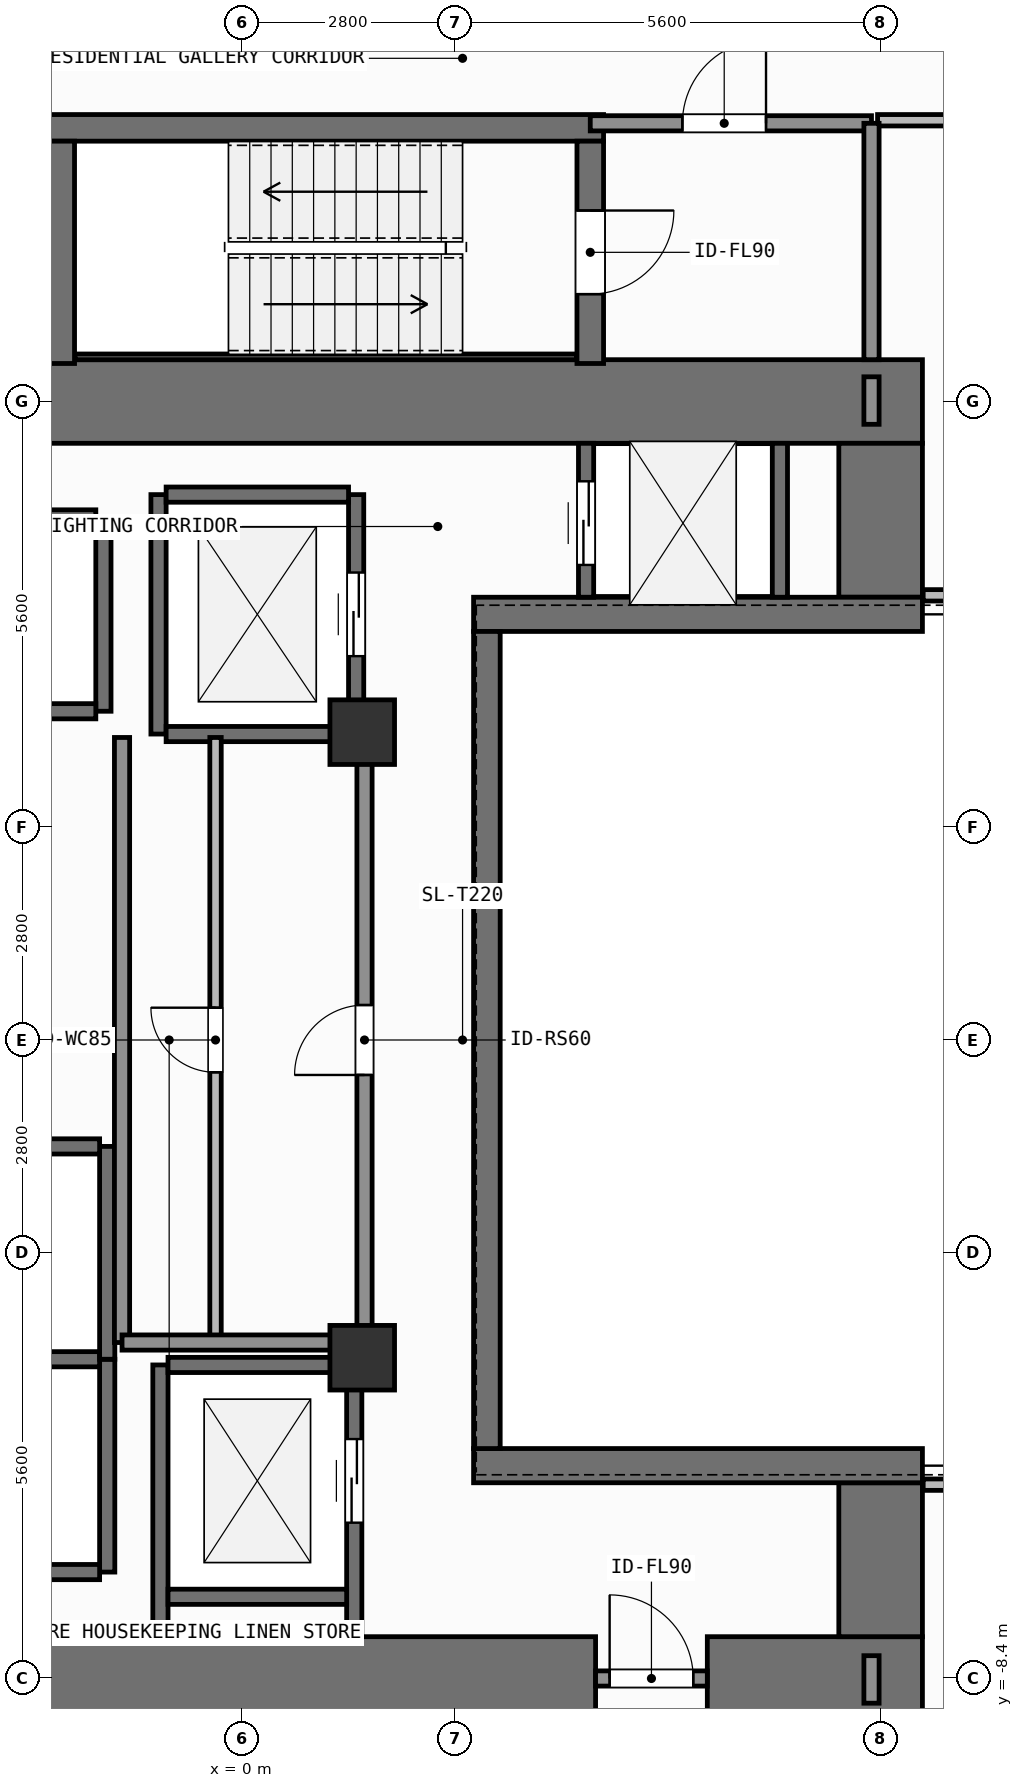
"""IFC4 building model, lengths in metres.
Left out: names, types, materials, properties, quantities, classifications, styles, units other than length and angle.
Written with IfcOpenShell. Run it as: python <this file> out.ifc"""

import sys

from ifc_helpers import new_model, si_unit, direction, frame, frame_2d, origin, origin_2d, place, context, subcontext, project, spatial, rectangle, extrude, element, fill, save


model = new_model("IFC4")
c1 = context("Model", 3, precision=1e-05, world=origin(), true_north=direction((0.0, 1.0)))
c2 = subcontext(c1, "Body", "Model", "MODEL_VIEW")
j1 = project(units=[si_unit("LENGTHUNIT", "METRE"), si_unit("PLANEANGLEUNIT", "RADIAN")], contexts=[c1])
p1 = place(None, origin())
s1 = spatial("IfcSite", under=j1, at=p1, CompositionType="ELEMENT")
p2 = place(p1, origin())
s2 = spatial("IfcBuilding", under=s1, at=p2, CompositionType="ELEMENT")
p3 = place(p2, frame((0.0, 0.0, 30.6)))
s3 = spatial("IfcBuildingStorey", under=s2, at=p3, CompositionType="ELEMENT", Elevation=30.6)
p4 = place(p3, frame((-2.62, -8.4, 0.0), z_axis=(0.0, 0.0, 1.0), x_axis=(1.0, 0.0, 0.0)))
e1 = element("IfcWall", 1, at=p4, inside=s3, PredefinedType="SHEAR", context=c2, shape_type="SweptSolid", body=[
    extrude(rectangle(XDim=7.27, YDim=1.1, at=frame_2d((3.635, 0.0))), origin(), (0.0, 0.0, 1.0), 3.9),
])
p5 = place(p3, frame((6.12, -8.4, 0.0), z_axis=(0.0, 0.0, 1.0), x_axis=(1.0, 0.0, 0.0)))
e2 = element("IfcWall", 2, at=p5, inside=s3, PredefinedType="SHEAR", context=c2, shape_type="SweptSolid", body=[
    extrude(rectangle(XDim=2.83, YDim=1.1, at=frame_2d((1.415, 0.0))), origin(), (0.0, 0.0, 1.0), 3.9),
])
p6 = place(p3, frame((-7.55, 8.4, 0.0), z_axis=(0.0, 0.0, 1.0), x_axis=(1.0, 0.0, 0.0)))
e3 = element("IfcWall", 3, at=p6, inside=s3, PredefinedType="SHEAR", context=c2, shape_type="SweptSolid", body=[
    extrude(rectangle(XDim=16.5, YDim=1.1, at=frame_2d((8.25, 0.0))), origin(), (0.0, 0.0, 1.0), 3.9),
])
for number, where, z_axis, x_axis in (
    (4, (8.4, -7.85, 0.0), (0.0, 0.0, 1.0), (0.0, 1.0, 0.0)),
    (5, (8.4, 5.825, 0.0), (0.0, 0.0, 1.0), (0.0, 1.0, 0.0)),
):
    element("IfcWall", number, at=place(p3, frame(where, z_axis=z_axis, x_axis=x_axis)), inside=s3, PredefinedType="SHEAR", context=c2, shape_type="SweptSolid", body=[
        extrude(rectangle(XDim=2.025, YDim=1.1, at=frame_2d((1.013, 0.0))), origin(), (0.0, 0.0, 1.0), 3.9),
    ])
for number, where, z_axis, x_axis in (
    (6, (3.045, -5.6, 0.0), (0.0, 0.0, 1.0), (1.0, 0.0, 0.0)),
    (7, (3.045, 5.6, 0.0), (0.0, 0.0, 1.0), (1.0, 0.0, 0.0)),
):
    element("IfcWall", number, at=place(p3, frame(where, z_axis=z_axis, x_axis=x_axis)), inside=s3, PredefinedType="SHEAR", context=c2, shape_type="SweptSolid", body=[
        extrude(rectangle(XDim=5.905, YDim=0.45, at=frame_2d((2.953, 0.0))), origin(), (0.0, 0.0, 1.0), 3.9),
    ])
p7 = place(p3, frame((3.22, -5.375, 0.0), z_axis=(0.0, 0.0, 1.0), x_axis=(0.0, 1.0, 0.0)))
e8 = element("IfcWall", 8, at=p7, inside=s3, PredefinedType="SHEAR", context=c2, shape_type="SweptSolid", body=[
    extrude(rectangle(XDim=10.75, YDim=0.35, at=frame_2d((5.375, 0.0))), origin(), (0.0, 0.0, 1.0), 3.9),
])
p8 = place(p3, frame((-2.555, 12.0, 0.0), z_axis=(0.0, 0.0, 1.0), x_axis=(1.0, 0.0, 0.0)))
e9 = element("IfcWall", 9, at=p8, inside=s3, PredefinedType="SHEAR", context=c2, shape_type="SweptSolid", body=[
    extrude(rectangle(XDim=7.31, YDim=0.35, at=frame_2d((3.655, 0.0))), origin(), (0.0, 0.0, 1.0), 3.9),
])
p9 = place(p3, frame((-2.2, 8.988, 0.0), z_axis=(0.0, 0.0, 1.0), x_axis=(1.0, 0.0, 0.0)))
e10 = element("IfcWall", 10, at=p9, inside=s3, PredefinedType="SHEAR", context=c2, shape_type="SweptSolid", body=[
    extrude(rectangle(XDim=6.6, YDim=0.075, at=frame_2d((3.3, 0.0))), origin(), (0.0, 0.0, 1.0), 3.9),
])
p10 = place(p3, frame((-2.38, 8.9, 0.0), z_axis=(0.0, 0.0, 1.0), x_axis=(0.0, 1.0, 0.0)))
e11 = element("IfcWall", 11, at=p10, inside=s3, PredefinedType="SHEAR", context=c2, shape_type="SweptSolid", body=[
    extrude(rectangle(XDim=2.925, YDim=0.35, at=frame_2d((1.462, 0.0))), origin(), (0.0, 0.0, 1.0), 3.9),
])
p11 = place(p3, frame((4.58, 11.825, 0.0), z_axis=(0.0, 0.0, 1.0), x_axis=(0.0, -1.0, 0.0)))
e12 = element("IfcWall", 12, at=p11, inside=s3, PredefinedType="SHEAR", context=c2, shape_type="SweptSolid", body=[
    extrude(rectangle(XDim=2.925, YDim=0.35, at=frame_2d((1.462, 0.0))), origin(), (0.0, 0.0, 1.0), 3.9),
])
p12 = place(p11, frame((0.913, 0.0, 0.0)))
e13 = element("IfcOpeningElement", 13, at=p12, cuts=e12, PredefinedType="OPENING", context=c2, shape_type="SweptSolid", body=[
    extrude(rectangle(XDim=1.1, YDim=2.15, at=frame_2d((0.55, 1.075))), frame((0.0, 0.185, 0.0), z_axis=(0.0, -1.0, 0.0), x_axis=(1.0, 0.0, 0.0)), (0.0, 0.0, 1.0), 0.37),
])
for number, where, z_axis, x_axis in (
    (14, (1.58, -4.18, 0.0), (0.0, 0.0, 1.0), (1.0, 0.0, 0.0)),
    (15, (1.58, 4.05, 0.0), (0.0, 0.0, 1.0), (1.0, 0.0, 0.0)),
):
    element("IfcColumn", number, at=place(p3, frame(where, z_axis=z_axis, x_axis=x_axis)), inside=s3, PredefinedType="COLUMN", context=c2, shape_type="SweptSolid", body=[
        extrude(rectangle(XDim=0.85, YDim=0.85, at=origin_2d()), origin(), (0.0, 0.0, 1.0), 3.9),
    ])
p13 = place(p3, frame((-1.825, 4.325, 0.0), z_axis=(0.0, 0.0, 1.0), x_axis=(0.0, 1.0, 0.0)))
e16 = element("IfcWall", 16, at=p13, inside=s3, PredefinedType="SHEAR", context=c2, shape_type="SweptSolid", body=[
    extrude(rectangle(XDim=2.55, YDim=0.2, at=frame_2d((1.275, 0.0))), origin(), (0.0, 0.0, 1.0), 3.68),
])
for number, where, z_axis, x_axis in (
    (17, (-4.275, 4.325, 0.0), (0.0, 0.0, 1.0), (1.0, 0.0, 0.0)),
    (18, (-4.275, 6.875, 0.0), (0.0, 0.0, 1.0), (1.0, 0.0, 0.0)),
):
    element("IfcWall", number, at=place(p3, frame(where, z_axis=z_axis, x_axis=x_axis)), inside=s3, PredefinedType="SHEAR", context=c2, shape_type="SweptSolid", body=[
        extrude(rectangle(XDim=2.35, YDim=0.2, at=frame_2d((1.175, 0.0))), origin(), (0.0, 0.0, 1.0), 3.68),
    ])
p14 = place(p3, frame((-1.775, -7.0, 0.0), z_axis=(0.0, 0.0, 1.0), x_axis=(0.0, 1.0, 0.0)))
e19 = element("IfcWall", 19, at=p14, inside=s3, PredefinedType="SHEAR", context=c2, shape_type="SweptSolid", body=[
    extrude(rectangle(XDim=2.8, YDim=0.2, at=frame_2d((1.4, 0.0))), origin(), (0.0, 0.0, 1.0), 3.68),
])
for number, where, z_axis, x_axis in (
    (20, (-4.325, -7.0, 0.0), (0.0, 0.0, 1.0), (1.0, 0.0, 0.0)),
    (21, (-4.325, -4.2, 0.0), (0.0, 0.0, 1.0), (1.0, 0.0, 0.0)),
):
    element("IfcWall", number, at=place(p3, frame(where, z_axis=z_axis, x_axis=x_axis)), inside=s3, PredefinedType="SHEAR", context=c2, shape_type="SweptSolid", body=[
        extrude(rectangle(XDim=2.45, YDim=0.2, at=frame_2d((1.225, 0.0))), origin(), (0.0, 0.0, 1.0), 3.68),
    ])
p15 = place(p3, frame((-1.775, -4.2, 0.0), z_axis=(0.0, 0.0, 1.0), x_axis=(0.0, 1.0, 0.0)))
e22 = element("IfcWall", 22, at=p15, inside=s3, PredefinedType="SHEAR", context=c2, shape_type="SweptSolid", body=[
    extrude(rectangle(XDim=2.8, YDim=0.2, at=frame_2d((1.4, 0.0))), origin(), (0.0, 0.0, 1.0), 3.68),
])
p16 = place(p3, frame((-4.325, -1.4, 0.0), z_axis=(0.0, 0.0, 1.0), x_axis=(1.0, 0.0, 0.0)))
e23 = element("IfcWall", 23, at=p16, inside=s3, PredefinedType="SHEAR", context=c2, shape_type="SweptSolid", body=[
    extrude(rectangle(XDim=2.45, YDim=0.2, at=frame_2d((1.225, 0.0))), origin(), (0.0, 0.0, 1.0), 3.68),
])
p17 = place(p3, frame((-1.1, 4.025, 0.0), z_axis=(0.0, 0.0, 1.0), x_axis=(0.0, 1.0, 0.0)))
e24 = element("IfcWall", 24, at=p17, inside=s3, PredefinedType="SHEAR", context=c2, shape_type="SweptSolid", body=[
    extrude(rectangle(XDim=3.15, YDim=0.2, at=frame_2d((1.575, 0.0))), origin(), (0.0, 0.0, 1.0), 3.68),
])
p18 = place(p3, frame((1.5, 4.025, 0.0), z_axis=(0.0, 0.0, 1.0), x_axis=(0.0, 1.0, 0.0)))
e25 = element("IfcWall", 25, at=p18, inside=s3, PredefinedType="SHEAR", context=c2, shape_type="SweptSolid", body=[
    extrude(rectangle(XDim=3.15, YDim=0.2, at=frame_2d((1.575, 0.0))), origin(), (0.0, 0.0, 1.0), 3.68),
])
p19 = place(p18, frame((1.025, 0.0, 0.0)))
e26 = element("IfcOpeningElement", 26, at=p19, cuts=e25, PredefinedType="OPENING", context=c2, shape_type="SweptSolid", body=[
    extrude(rectangle(XDim=1.1, YDim=2.2, at=frame_2d((0.55, 1.1))), frame((0.0, 0.11, 0.0), z_axis=(0.0, -1.0, 0.0), x_axis=(1.0, 0.0, 0.0)), (0.0, 0.0, 1.0), 0.22),
])
for number, where, z_axis, x_axis in (
    (27, (-1.0, 4.025, 0.0), (0.0, 0.0, 1.0), (1.0, 0.0, 0.0)),
    (28, (-1.0, 7.175, 0.0), (0.0, 0.0, 1.0), (1.0, 0.0, 0.0)),
):
    element("IfcWall", number, at=place(p3, frame(where, z_axis=z_axis, x_axis=x_axis)), inside=s3, PredefinedType="SHEAR", context=c2, shape_type="SweptSolid", body=[
        extrude(rectangle(XDim=2.4, YDim=0.2, at=frame_2d((1.2, 0.0))), origin(), (0.0, 0.0, 1.0), 3.68),
    ])
p20 = place(p3, frame((-1.075, -7.85, 0.0), z_axis=(0.0, 0.0, 1.0), x_axis=(0.0, 1.0, 0.0)))
e29 = element("IfcWall", 29, at=p20, inside=s3, PredefinedType="SHEAR", context=c2, shape_type="SweptSolid", body=[
    extrude(rectangle(XDim=3.575, YDim=0.2, at=frame_2d((1.788, 0.0))), origin(), (0.0, 0.0, 1.0), 3.68),
])
p21 = place(p3, frame((1.475, -7.85, 0.0), z_axis=(0.0, 0.0, 1.0), x_axis=(0.0, 1.0, 0.0)))
e30 = element("IfcWall", 30, at=p21, inside=s3, PredefinedType="SHEAR", context=c2, shape_type="SweptSolid", body=[
    extrude(rectangle(XDim=3.575, YDim=0.2, at=frame_2d((1.788, 0.0))), origin(), (0.0, 0.0, 1.0), 3.68),
])
p22 = place(p21, frame((1.5, 0.0, 0.0)))
e31 = element("IfcOpeningElement", 31, at=p22, cuts=e30, PredefinedType="OPENING", context=c2, shape_type="SweptSolid", body=[
    extrude(rectangle(XDim=1.1, YDim=2.2, at=frame_2d((0.55, 1.1))), frame((0.0, 0.11, 0.0), z_axis=(0.0, -1.0, 0.0), x_axis=(1.0, 0.0, 0.0)), (0.0, 0.0, 1.0), 0.22),
])
for number, where, z_axis, x_axis in (
    (32, (-0.975, -7.325, 0.0), (0.0, 0.0, 1.0), (1.0, 0.0, 0.0)),
    (33, (-0.975, -4.275, 0.0), (0.0, 0.0, 1.0), (1.0, 0.0, 0.0)),
):
    element("IfcWall", number, at=place(p3, frame(where, z_axis=z_axis, x_axis=x_axis)), inside=s3, PredefinedType="SHEAR", context=c2, shape_type="SweptSolid", body=[
        extrude(rectangle(XDim=2.35, YDim=0.2, at=frame_2d((1.175, 0.0))), origin(), (0.0, 0.0, 1.0), 3.68),
    ])
p23 = place(p3, frame((4.525, 5.825, 0.0), z_axis=(0.0, 0.0, 1.0), x_axis=(0.0, 1.0, 0.0)))
e34 = element("IfcWall", 34, at=p23, inside=s3, PredefinedType="SHEAR", context=c2, shape_type="SweptSolid", body=[
    extrude(rectangle(XDim=2.025, YDim=0.2, at=frame_2d((1.013, 0.0))), origin(), (0.0, 0.0, 1.0), 3.68),
])
p24 = place(p23, frame((0.425, 0.0, 0.0)))
e35 = element("IfcOpeningElement", 35, at=p24, cuts=e34, PredefinedType="OPENING", context=c2, shape_type="SweptSolid", body=[
    extrude(rectangle(XDim=1.1, YDim=2.2, at=frame_2d((0.55, 1.1))), frame((0.0, 0.11, 0.0), z_axis=(0.0, -1.0, 0.0), x_axis=(1.0, 0.0, 0.0)), (0.0, 0.0, 1.0), 0.22),
])
p25 = place(p3, frame((7.075, 5.825, 0.0), z_axis=(0.0, 0.0, 1.0), x_axis=(0.0, 1.0, 0.0)))
e36 = element("IfcWall", 36, at=p25, inside=s3, PredefinedType="SHEAR", context=c2, shape_type="SweptSolid", body=[
    extrude(rectangle(XDim=2.025, YDim=0.2, at=frame_2d((1.013, 0.0))), origin(), (0.0, 0.0, 1.0), 3.68),
])
p26 = place(p3, frame((4.65, -8.4, 0.0), z_axis=(0.0, 0.0, 1.0), x_axis=(1.0, 0.0, 0.0)))
e37 = element("IfcWall", 37, at=p26, inside=s3, PredefinedType="SOLIDWALL", context=c2, shape_type="SweptSolid", body=[
    extrude(rectangle(XDim=1.47, YDim=0.2, at=frame_2d((0.735, 0.0))), origin(), (0.0, 0.0, 1.0), 2.72),
])
p27 = place(p26, frame((0.185, 0.0, 0.0)))
e38 = element("IfcOpeningElement", 38, at=p27, cuts=e37, PredefinedType="OPENING", context=c2, shape_type="SweptSolid", body=[
    extrude(rectangle(XDim=1.1, YDim=2.15, at=frame_2d((0.55, 1.075))), frame((0.0, 0.11, 0.0), z_axis=(0.0, -1.0, 0.0), x_axis=(1.0, 0.0, 0.0)), (0.0, 0.0, 1.0), 0.22),
])
p28 = place(p3, frame((4.58, 12.06, 0.0), z_axis=(0.0, 0.0, 1.0), x_axis=(1.0, 0.0, 0.0)))
e39 = element("IfcWall", 39, at=p28, inside=s3, PredefinedType="SOLIDWALL", context=c2, shape_type="SweptSolid", body=[
    extrude(rectangle(XDim=3.7, YDim=0.2, at=frame_2d((1.85, 0.0))), origin(), (0.0, 0.0, 1.0), 3.68),
])
p29 = place(p28, frame((1.212, 0.0, 0.0)))
e40 = element("IfcOpeningElement", 40, at=p29, cuts=e39, PredefinedType="OPENING", context=c2, shape_type="SweptSolid", body=[
    extrude(rectangle(XDim=1.1, YDim=2.15, at=frame_2d((0.55, 1.075))), frame((0.0, 0.11, 0.0), z_axis=(0.0, -1.0, 0.0), x_axis=(1.0, 0.0, 0.0)), (0.0, 0.0, 1.0), 0.22),
])
p30 = place(p3, frame((-0.35, -3.98, 0.0), z_axis=(0.0, 0.0, 1.0), x_axis=(0.0, 1.0, 0.0)))
e41 = element("IfcWall", 41, at=p30, inside=s3, PredefinedType="PARTITIONING", context=c2, shape_type="SweptSolid", body=[
    extrude(rectangle(XDim=7.96, YDim=0.15, at=frame_2d((3.98, 0.0))), origin(), (0.0, 0.0, 1.0), 3.68),
])
p31 = place(p30, frame((3.555, 0.0, 0.0)))
e42 = element("IfcOpeningElement", 42, at=p31, cuts=e41, PredefinedType="OPENING", context=c2, shape_type="SweptSolid", body=[
    extrude(rectangle(XDim=0.85, YDim=2.1, at=frame_2d((0.425, 1.05))), frame((0.0, 0.085, 0.0), z_axis=(0.0, -1.0, 0.0), x_axis=(1.0, 0.0, 0.0)), (0.0, 0.0, 1.0), 0.17),
])
p32 = place(p3, frame((1.61, -3.98, 0.0), z_axis=(0.0, 0.0, 1.0), x_axis=(0.0, 1.0, 0.0)))
e43 = element("IfcWall", 43, at=p32, inside=s3, PredefinedType="SOLIDWALL", context=c2, shape_type="SweptSolid", body=[
    extrude(rectangle(XDim=7.96, YDim=0.2, at=frame_2d((3.98, 0.0))), origin(), (0.0, 0.0, 1.0), 3.68),
])
p33 = place(p32, frame((3.52, 0.0, 0.0)))
e44 = element("IfcOpeningElement", 44, at=p33, cuts=e43, PredefinedType="OPENING", context=c2, shape_type="SweptSolid", body=[
    extrude(rectangle(XDim=0.92, YDim=2.1, at=frame_2d((0.46, 1.05))), frame((0.0, 0.11, 0.0), z_axis=(0.0, -1.0, 0.0), x_axis=(1.0, 0.0, 0.0)), (0.0, 0.0, 1.0), 0.22),
])
p34 = place(p3, frame((8.36, 12.1, 0.0), z_axis=(0.0, 0.0, 1.0), x_axis=(1.0, 0.0, 0.0)))
e45 = element("IfcWall", 45, at=p34, inside=s3, PredefinedType="PARTITIONING", context=c2, shape_type="SweptSolid", body=[
    extrude(rectangle(XDim=7.22, YDim=0.15, at=frame_2d((3.61, 0.0))), origin(), (0.0, 0.0, 1.0), 3.68),
])
p35 = place(p34, frame((3.513, 0.0, 0.0)))
e46 = element("IfcOpeningElement", 46, at=p35, cuts=e45, PredefinedType="OPENING", context=c2, shape_type="SweptSolid", body=[
    extrude(rectangle(XDim=0.9, YDim=2.1, at=frame_2d((0.45, 1.05))), frame((0.0, 0.085, 0.0), z_axis=(0.0, -1.0, 0.0), x_axis=(1.0, 0.0, 0.0)), (0.0, 0.0, 1.0), 0.17),
])
p36 = place(p3, frame((8.28, 8.95, 0.0), z_axis=(0.0, 0.0, 1.0), x_axis=(0.0, 1.0, 0.0)))
e47 = element("IfcWall", 47, at=p36, inside=s3, PredefinedType="SOLIDWALL", context=c2, shape_type="SweptSolid", body=[
    extrude(rectangle(XDim=3.11, YDim=0.2, at=frame_2d((1.555, 0.0))), origin(), (0.0, 0.0, 1.0), 3.68),
])
p37 = place(p3, frame((-1.58, -3.98, 0.0), z_axis=(0.0, 0.0, 1.0), x_axis=(0.0, 1.0, 0.0)))
e48 = element("IfcWall", 48, at=p37, inside=s3, PredefinedType="SOLIDWALL", context=c2, shape_type="SweptSolid", body=[
    extrude(rectangle(XDim=7.96, YDim=0.2, at=frame_2d((3.98, 0.0))), origin(), (0.0, 0.0, 1.0), 3.68),
])
p38 = place(p3, frame((-1.58, -3.98, 0.0), z_axis=(0.0, 0.0, 1.0), x_axis=(1.0, 0.0, 0.0)))
e49 = element("IfcWall", 49, at=p38, inside=s3, PredefinedType="SOLIDWALL", context=c2, shape_type="SweptSolid", body=[
    extrude(rectangle(XDim=3.19, YDim=0.2, at=frame_2d((1.595, 0.0))), origin(), (0.0, 0.0, 1.0), 3.68),
])
p39 = place(p3, frame((8.28, -8.725, 0.0), z_axis=(0.0, 0.0, 1.0), x_axis=(0.0, 1.0, 0.0)))
e50 = element("IfcWall", 50, at=p39, inside=s3, PredefinedType="SOLIDWALL", context=c2, shape_type="SweptSolid", body=[
    extrude(rectangle(XDim=0.625, YDim=0.2, at=frame_2d((0.312, 0.0))), origin(), (0.0, 0.0, 1.0), 3.68),
])
p40 = place(p3, frame((8.96, -5.85, 0.0), z_axis=(0.0, 0.0, 1.0), x_axis=(1.0, 0.0, 0.0)))
e51 = element("IfcWall", 51, at=p40, inside=s3, PredefinedType="PARTITIONING", context=c2, shape_type="SweptSolid", body=[
    extrude(rectangle(XDim=6.62, YDim=0.15, at=frame_2d((3.31, 0.0))), origin(), (0.0, 0.0, 1.0), 3.68),
])
p41 = place(p3, frame((8.28, 8.1, 0.0), z_axis=(0.0, 0.0, 1.0), x_axis=(0.0, 1.0, 0.0)))
e52 = element("IfcWall", 52, at=p41, inside=s3, PredefinedType="SOLIDWALL", context=c2, shape_type="SweptSolid", body=[
    extrude(rectangle(XDim=0.625, YDim=0.2, at=frame_2d((0.312, 0.0))), origin(), (0.0, 0.0, 1.0), 3.68),
])
p42 = place(p3, frame((8.96, 5.85, 0.0), z_axis=(0.0, 0.0, 1.0), x_axis=(1.0, 0.0, 0.0)))
e53 = element("IfcWall", 53, at=p42, inside=s3, PredefinedType="PARTITIONING", context=c2, shape_type="SweptSolid", body=[
    extrude(rectangle(XDim=6.62, YDim=0.15, at=frame_2d((3.31, 0.0))), origin(), (0.0, 0.0, 1.0), 3.68),
])
p43 = place(p19, origin())
e54 = element("IfcDoor", 54, at=p43, inside=s3, OperationType="SLIDING_TO_LEFT", PredefinedType="DOOR", context=c2, shape_type="SweptSolid", body=[
    extrude(rectangle(XDim=1.1, YDim=2.2, at=frame_2d((0.55, 1.1))), frame((0.0, 0.025, 0.0), z_axis=(0.0, -1.0, 0.0), x_axis=(1.0, 0.0, 0.0)), (0.0, 0.0, 1.0), 0.05),
])
fill(e26, e54)
p44 = place(p22, origin())
e55 = element("IfcDoor", 55, at=p44, inside=s3, OperationType="SLIDING_TO_LEFT", PredefinedType="DOOR", context=c2, shape_type="SweptSolid", body=[
    extrude(rectangle(XDim=1.1, YDim=2.2, at=frame_2d((0.55, 1.1))), frame((0.0, 0.025, 0.0), z_axis=(0.0, -1.0, 0.0), x_axis=(1.0, 0.0, 0.0)), (0.0, 0.0, 1.0), 0.05),
])
fill(e31, e55)
p45 = place(p24, origin())
e56 = element("IfcDoor", 56, at=p45, inside=s3, OperationType="SLIDING_TO_LEFT", PredefinedType="DOOR", context=c2, shape_type="SweptSolid", body=[
    extrude(rectangle(XDim=1.1, YDim=2.2, at=frame_2d((0.55, 1.1))), frame((0.0, 0.025, 0.0), z_axis=(0.0, -1.0, 0.0), x_axis=(1.0, 0.0, 0.0)), (0.0, 0.0, 1.0), 0.05),
])
fill(e35, e56)
p46 = place(p12, origin())
e57 = element("IfcDoor", 57, at=p46, inside=s3, OperationType="SINGLE_SWING_LEFT", PredefinedType="DOOR", context=c2, shape_type="SweptSolid", body=[
    extrude(rectangle(XDim=1.1, YDim=2.15, at=frame_2d((0.55, 1.075))), frame((0.0, 0.025, 0.0), z_axis=(0.0, -1.0, 0.0), x_axis=(1.0, 0.0, 0.0)), (0.0, 0.0, 1.0), 0.05),
])
fill(e13, e57)
p47 = place(p27, origin())
e58 = element("IfcDoor", 58, at=p47, inside=s3, OperationType="SINGLE_SWING_LEFT", PredefinedType="DOOR", context=c2, shape_type="SweptSolid", body=[
    extrude(rectangle(XDim=1.1, YDim=2.15, at=frame_2d((0.55, 1.075))), frame((0.0, 0.025, 0.0), z_axis=(0.0, -1.0, 0.0), x_axis=(1.0, 0.0, 0.0)), (0.0, 0.0, 1.0), 0.05),
])
fill(e38, e58)
p48 = place(p29, origin())
e59 = element("IfcDoor", 59, at=p48, inside=s3, OperationType="SINGLE_SWING_RIGHT", PredefinedType="DOOR", context=c2, shape_type="SweptSolid", body=[
    extrude(rectangle(XDim=1.1, YDim=2.15, at=frame_2d((0.55, 1.075))), frame((0.0, 0.025, 0.0), z_axis=(0.0, -1.0, 0.0), x_axis=(1.0, 0.0, 0.0)), (0.0, 0.0, 1.0), 0.05),
])
fill(e40, e59)
p49 = place(p31, origin())
e60 = element("IfcDoor", 60, at=p49, inside=s3, OperationType="SINGLE_SWING_RIGHT", PredefinedType="DOOR", context=c2, shape_type="SweptSolid", body=[
    extrude(rectangle(XDim=0.85, YDim=2.1, at=frame_2d((0.425, 1.05))), frame((0.0, 0.025, 0.0), z_axis=(0.0, -1.0, 0.0), x_axis=(1.0, 0.0, 0.0)), (0.0, 0.0, 1.0), 0.05),
])
fill(e42, e60)
p50 = place(p33, origin())
e61 = element("IfcDoor", 61, at=p50, inside=s3, OperationType="SINGLE_SWING_LEFT", PredefinedType="DOOR", context=c2, shape_type="SweptSolid", body=[
    extrude(rectangle(XDim=0.92, YDim=2.1, at=frame_2d((0.46, 1.05))), frame((0.0, 0.025, 0.0), z_axis=(0.0, -1.0, 0.0), x_axis=(1.0, 0.0, 0.0)), (0.0, 0.0, 1.0), 0.05),
])
fill(e44, e61)
save(model, sys.argv[1])
